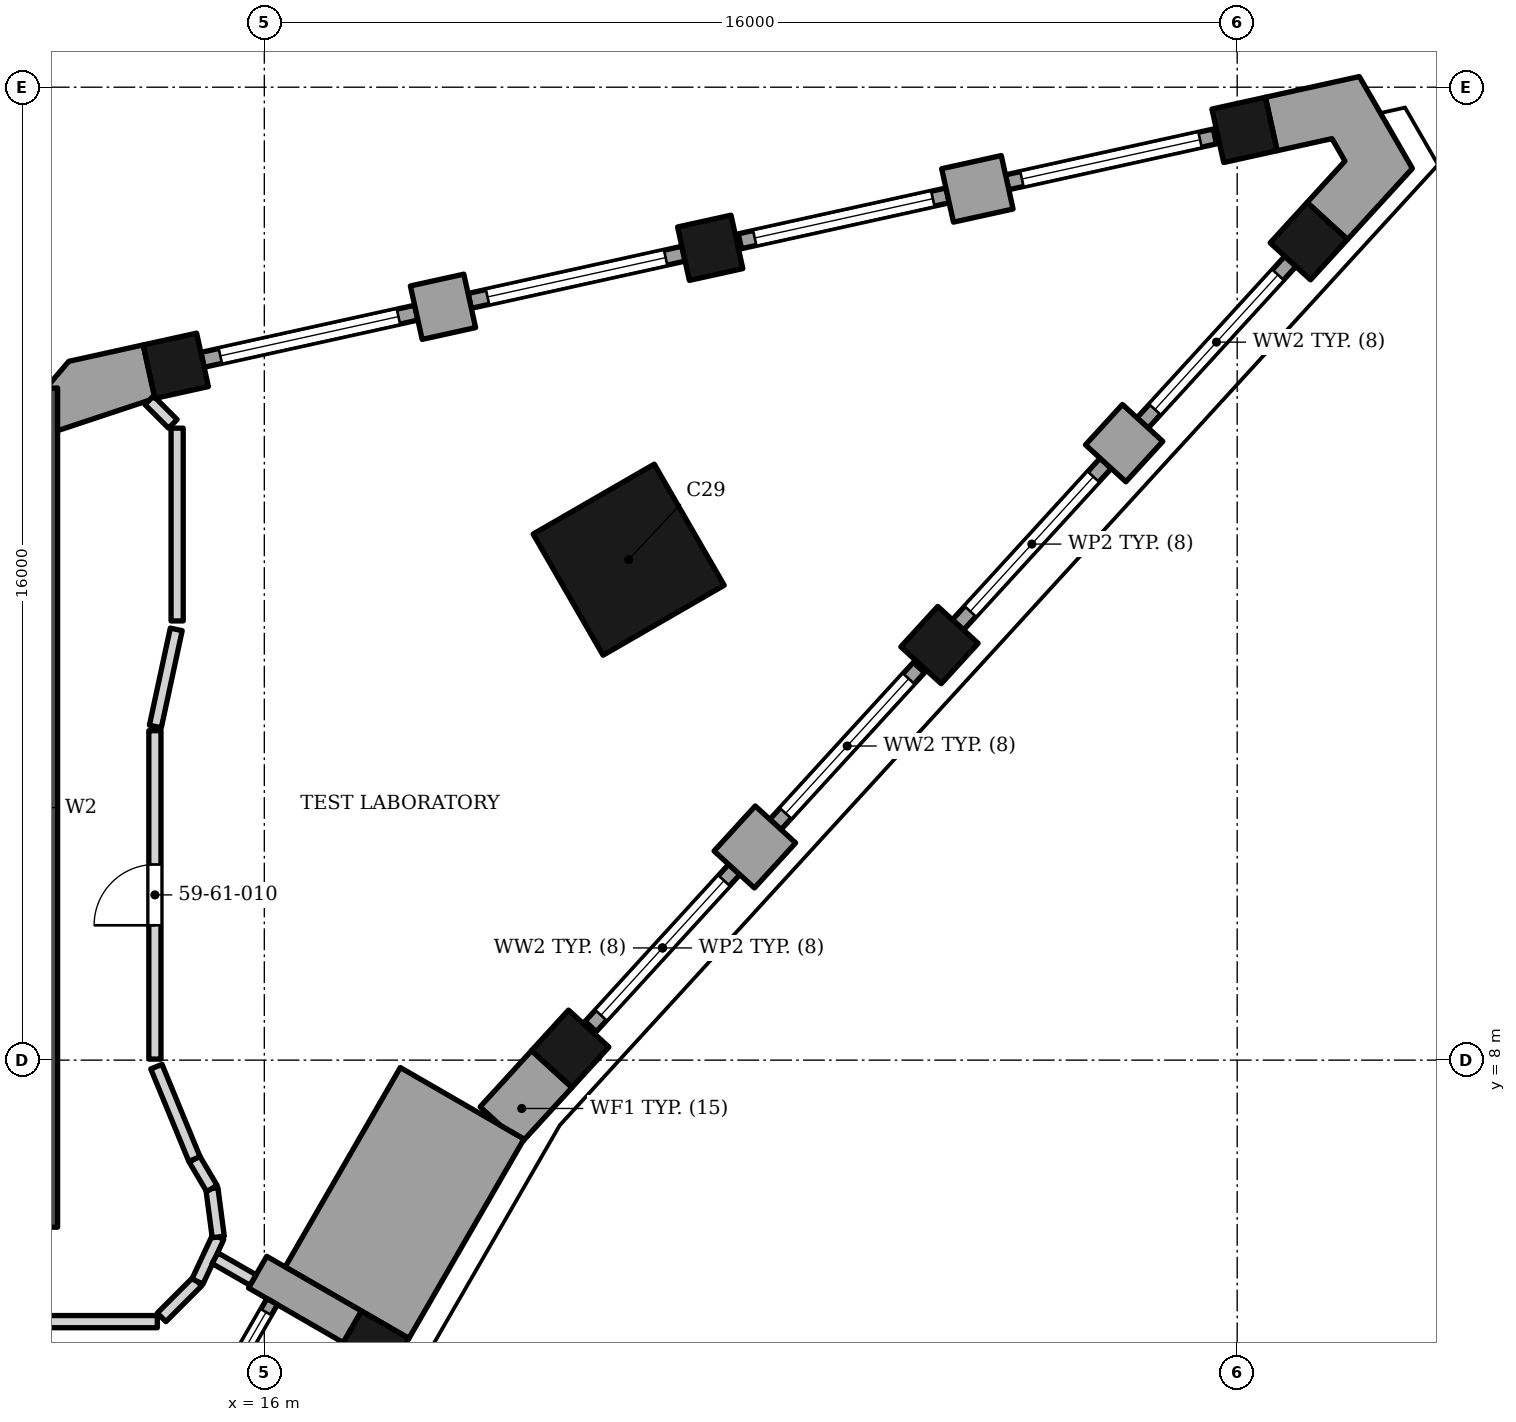
"""IFC4 building model, lengths in metres.
Left out: names, types, materials, properties, quantities, classifications, styles, units other than length and angle.
Written with IfcOpenShell. Run it as: python <this file> out.ifc"""

import sys

from ifc_helpers import new_model, si_unit, direction, frame, frame_2d, origin, origin_2d, place, context, subcontext, project, spatial, polyline, rectangle, outline, extrude, element, fill, save


model = new_model("IFC4")
c1 = context("Model", 3, precision=1e-05, world=origin(), true_north=direction((0.0, 1.0)))
c2 = subcontext(c1, "Body", "Model", "MODEL_VIEW")
j1 = project(units=[si_unit("LENGTHUNIT", "METRE"), si_unit("PLANEANGLEUNIT", "RADIAN")], contexts=[c1])
p1 = place(None, origin())
s1 = spatial("IfcSite", under=j1, at=p1, CompositionType="ELEMENT")
p2 = place(p1, origin())
s2 = spatial("IfcBuilding", under=s1, at=p2, CompositionType="ELEMENT")
p3 = place(p2, frame((0.0, 0.0, 248.2)))
s3 = spatial("IfcBuildingStorey", under=s2, at=p3, CompositionType="ELEMENT", Elevation=248.2)
p4 = place(p3, frame((12.35, 5.253, 0.0), z_axis=(0.0, 0.0, 1.0), x_axis=(0.0, 1.0, 0.0)))
e1 = element("IfcWall", 1, at=p4, inside=s3, PredefinedType="SHEAR", context=c2, shape_type="SweptSolid", body=[
    extrude(rectangle(XDim=13.8, YDim=0.5, at=frame_2d((6.9, 0.0))), origin(), (0.0, 0.0, 1.0), 3.9),
])
p5 = place(p3, frame((21.992, 16.23, 0.0), z_axis=(0.0, 0.0, 1.0), x_axis=(-0.866025377604, -0.500000045345, 0.0)))
e2 = element("IfcColumn", 2, at=p5, inside=s3, PredefinedType="COLUMN", context=c2, shape_type="SweptSolid", body=[
    extrude(rectangle(XDim=2.3, YDim=2.3, at=origin_2d()), origin(), (0.0, 0.0, 1.0), 3.9),
])
for number, where, z_axis, x_axis in (
    (3, (17.763, 3.259, 0.0), (0.0, 0.0, 1.0), (0.5, 0.866, 0.0)),
    (4, (21.031, 8.187, 0.0), (0.0, 0.0, 1.0), (0.675, 0.738, 0.0)),
    (5, (27.104, 14.826, 0.0), (0.0, 0.0, 1.0), (0.675, 0.738, 0.0)),
    (6, (33.178, 21.468, 0.0), (0.0, 0.0, 1.0), (0.675, 0.738, 0.0)),
    (7, (32.121, 23.298, 0.0), (0.0, 0.0, 1.0), (-0.977, -0.215, 0.0)),
    (8, (23.333, 21.359, 0.0), (0.0, 0.0, 1.0), (-0.977, -0.215, 0.0)),
    (9, (14.544, 19.419, 0.0), (0.0, 0.0, 1.0), (-0.977, -0.215, 0.0)),
):
    element("IfcColumn", number, at=place(p3, frame(where, z_axis=z_axis, x_axis=x_axis)), inside=s3, PredefinedType="COLUMN", context=c2, shape_type="SweptSolid", body=[
        extrude(rectangle(XDim=0.9, YDim=0.9, at=origin_2d()), origin(), (0.0, 0.0, 1.0), 3.9),
    ])
p6 = place(p3, frame((17.448, 3.614, 0.0), z_axis=(0.0, 0.0, 1.0), x_axis=(-0.865989075817, 0.500062916607, 0.0)))
e10 = element("IfcWall", 10, at=p6, inside=s3, PredefinedType="SOLIDWALL", context=c2, shape_type="SweptSolid", body=[
    extrude(rectangle(XDim=1.8, YDim=0.6, at=frame_2d((0.9, 0.0))), origin(), (0.0, 0.0, 1.0), 2.95),
])
p7 = place(p3, frame((14.029, 0.392, 0.0), z_axis=(0.0, 0.0, 1.0), x_axis=(0.500027713859, 0.866009402589, 0.0)))
e11 = element("IfcWall", 11, at=p7, inside=s3, PredefinedType="ELEMENTEDWALL", context=c2, shape_type="SweptSolid", body=[
    extrude(rectangle(XDim=4.2, YDim=0.2, at=frame_2d((2.1, 0.0))), origin(), (0.0, 0.0, 1.0), 2.95),
])
p8 = place(p7, frame((0.2, 0.0, 0.45)))
e12 = element("IfcOpeningElement", 12, at=p8, cuts=e11, PredefinedType="OPENING", context=c2, shape_type="SweptSolid", body=[
    extrude(rectangle(XDim=3.8, YDim=2.25, at=frame_2d((1.9, 1.125))), frame((0.0, 0.11, 0.0), z_axis=(0.0, -1.0, 0.0), x_axis=(1.0, 0.0, 0.0)), (0.0, 0.0, 1.0), 0.22),
])
p9 = place(p3, origin())
e13 = element("IfcWall", 13, at=p9, inside=s3, PredefinedType="SOLIDWALL", context=c2, shape_type="SweptSolid", body=[
    extrude(outline(polyline([(18.378, 3.424), (18.378, 3.424), (18.378, 3.424), (20.271, 6.703), (18.236, 7.878), (16.343, 4.599), (17.598, 3.874), (17.598, 3.874), (18.378, 3.424)])), origin(), (0.0, 0.0, 1.0), 2.974),
])
p10 = place(p3, frame((23.729, 11.135, 0.0), z_axis=(0.0, 0.0, 1.0), x_axis=(0.674788120713, 0.738011512203, 0.0)))
e14 = element("IfcWall", 14, at=p10, inside=s3, PredefinedType="SOLIDWALL", context=c2, shape_type="SweptSolid", body=[
    extrude(rectangle(XDim=1.004, YDim=0.9, at=frame_2d((0.502, 0.0))), origin(), (0.0, 0.0, 1.0), 3.0),
])
p11 = place(p3, frame((30.445, 18.479, 0.0), z_axis=(0.0, 0.0, 1.0), x_axis=(-0.674938051731, -0.737874397391, 0.0)))
e15 = element("IfcWall", 15, at=p11, inside=s3, PredefinedType="SOLIDWALL", context=c2, shape_type="SweptSolid", body=[
    extrude(rectangle(XDim=0.9, YDim=0.9, at=frame_2d((0.45, 0.0))), origin(), (0.0, 0.0, 1.0), 3.0),
])
p12 = place(p3, frame((21.368, 8.554, 0.0), z_axis=(0.0, 0.0, 1.0), x_axis=(0.67487449122, 0.737932531537, 0.0)))
e16 = element("IfcWall", 16, at=p12, inside=s3, PredefinedType="ELEMENTEDWALL", context=c2, shape_type="SweptSolid", body=[
    extrude(rectangle(XDim=3.5, YDim=0.25, at=frame_2d((1.75, 0.0))), origin(), (0.0, 0.0, 1.0), 3.0),
])
p13 = place(p12, frame((0.25, 0.0, 0.3)))
e17 = element("IfcOpeningElement", 17, at=p13, cuts=e16, PredefinedType="OPENING", context=c2, shape_type="SweptSolid", body=[
    extrude(rectangle(XDim=3.0, YDim=2.5, at=frame_2d((1.5, 1.25))), frame((0.0, 0.135, 0.0), z_axis=(0.0, -1.0, 0.0), x_axis=(1.0, 0.0, 0.0)), (0.0, 0.0, 1.0), 0.27),
])
p14 = place(p3, frame((24.405, 11.875, 0.0), z_axis=(0.0, 0.0, 1.0), x_axis=(0.67487449122, 0.737932531537, 0.0)))
e18 = element("IfcWall", 18, at=p14, inside=s3, PredefinedType="ELEMENTEDWALL", context=c2, shape_type="SweptSolid", body=[
    extrude(rectangle(XDim=3.5, YDim=0.25, at=frame_2d((1.75, 0.0))), origin(), (0.0, 0.0, 1.0), 3.0),
])
p15 = place(p14, frame((0.25, 0.0, 0.3)))
e19 = element("IfcOpeningElement", 19, at=p15, cuts=e18, PredefinedType="OPENING", context=c2, shape_type="SweptSolid", body=[
    extrude(rectangle(XDim=3.0, YDim=2.5, at=frame_2d((1.5, 1.25))), frame((0.0, 0.135, 0.0), z_axis=(0.0, -1.0, 0.0), x_axis=(1.0, 0.0, 0.0)), (0.0, 0.0, 1.0), 0.27),
])
p16 = place(p3, frame((27.408, 15.158, 0.0), z_axis=(0.0, 0.0, 1.0), x_axis=(0.674833575111, 0.737969949187, 0.0)))
e20 = element("IfcWall", 20, at=p16, inside=s3, PredefinedType="ELEMENTEDWALL", context=c2, shape_type="SweptSolid", body=[
    extrude(rectangle(XDim=3.6, YDim=0.25, at=frame_2d((1.8, 0.0))), origin(), (0.0, 0.0, 1.0), 3.0),
])
p17 = place(p16, frame((0.3, 0.0, 0.3)))
e21 = element("IfcOpeningElement", 21, at=p17, cuts=e20, PredefinedType="OPENING", context=c2, shape_type="SweptSolid", body=[
    extrude(rectangle(XDim=3.0, YDim=2.5, at=frame_2d((1.5, 1.25))), frame((0.0, 0.135, 0.0), z_axis=(0.0, -1.0, 0.0), x_axis=(1.0, 0.0, 0.0)), (0.0, 0.0, 1.0), 0.27),
])
p18 = place(p3, frame((30.445, 18.479, 0.0), z_axis=(0.0, 0.0, 1.0), x_axis=(0.674833575111, 0.737969949187, 0.0)))
e22 = element("IfcWall", 22, at=p18, inside=s3, PredefinedType="ELEMENTEDWALL", context=c2, shape_type="SweptSolid", body=[
    extrude(rectangle(XDim=3.6, YDim=0.25, at=frame_2d((1.8, 0.0))), origin(), (0.0, 0.0, 1.0), 3.0),
])
p19 = place(p18, frame((0.3, 0.0, 0.3)))
e23 = element("IfcOpeningElement", 23, at=p19, cuts=e22, PredefinedType="OPENING", context=c2, shape_type="SweptSolid", body=[
    extrude(rectangle(XDim=3.0, YDim=2.5, at=frame_2d((1.5, 1.25))), frame((0.0, 0.135, 0.0), z_axis=(0.0, -1.0, 0.0), x_axis=(1.0, 0.0, 0.0)), (0.0, 0.0, 1.0), 0.27),
])
p20 = place(p3, frame((28.217, 22.436, 0.0), z_axis=(0.0, 0.0, 1.0), x_axis=(-0.97656888558, -0.215205045752, 0.0)))
e24 = element("IfcWall", 24, at=p20, inside=s3, PredefinedType="SOLIDWALL", context=c2, shape_type="SweptSolid", body=[
    extrude(rectangle(XDim=1.004, YDim=0.9, at=frame_2d((0.502, 0.0))), origin(), (0.0, 0.0, 1.0), 3.0),
])
p21 = place(p3, frame((18.499, 20.292, 0.0), z_axis=(0.0, 0.0, 1.0), x_axis=(0.976473402733, 0.215637876437, 0.0)))
e25 = element("IfcWall", 25, at=p21, inside=s3, PredefinedType="SOLIDWALL", context=c2, shape_type="SweptSolid", body=[
    extrude(rectangle(XDim=0.9, YDim=0.9, at=frame_2d((0.45, 0.0))), origin(), (0.0, 0.0, 1.0), 3.0),
])
p22 = place(p3, frame((31.633, 23.19, 0.0), z_axis=(0.0, 0.0, 1.0), x_axis=(-0.976509313763, -0.215475196101, 0.0)))
e26 = element("IfcWall", 26, at=p22, inside=s3, PredefinedType="ELEMENTEDWALL", context=c2, shape_type="SweptSolid", body=[
    extrude(rectangle(XDim=3.5, YDim=0.25, at=frame_2d((1.75, 0.0))), origin(), (0.0, 0.0, 1.0), 3.0),
])
p23 = place(p22, frame((0.25, 0.0, 0.3)))
e27 = element("IfcOpeningElement", 27, at=p23, cuts=e26, PredefinedType="OPENING", context=c2, shape_type="SweptSolid", body=[
    extrude(rectangle(XDim=3.0, YDim=2.5, at=frame_2d((1.5, 1.25))), frame((0.0, 0.135, 0.0), z_axis=(0.0, -1.0, 0.0), x_axis=(1.0, 0.0, 0.0)), (0.0, 0.0, 1.0), 0.27),
])
p24 = place(p3, frame((27.239, 22.22, 0.0), z_axis=(0.0, 0.0, 1.0), x_axis=(-0.976509313763, -0.215475196101, 0.0)))
e28 = element("IfcWall", 28, at=p24, inside=s3, PredefinedType="ELEMENTEDWALL", context=c2, shape_type="SweptSolid", body=[
    extrude(rectangle(XDim=3.5, YDim=0.25, at=frame_2d((1.75, 0.0))), origin(), (0.0, 0.0, 1.0), 3.0),
])
p25 = place(p24, frame((0.25, 0.0, 0.3)))
e29 = element("IfcOpeningElement", 29, at=p25, cuts=e28, PredefinedType="OPENING", context=c2, shape_type="SweptSolid", body=[
    extrude(rectangle(XDim=3.0, YDim=2.5, at=frame_2d((1.5, 1.25))), frame((0.0, 0.135, 0.0), z_axis=(0.0, -1.0, 0.0), x_axis=(1.0, 0.0, 0.0)), (0.0, 0.0, 1.0), 0.27),
])
p26 = place(p3, frame((22.893, 21.262, 0.0), z_axis=(0.0, 0.0, 1.0), x_axis=(-0.976513072969, -0.215458159096, 0.0)))
e30 = element("IfcWall", 30, at=p26, inside=s3, PredefinedType="ELEMENTEDWALL", context=c2, shape_type="SweptSolid", body=[
    extrude(rectangle(XDim=3.6, YDim=0.25, at=frame_2d((1.8, 0.0))), origin(), (0.0, 0.0, 1.0), 3.0),
])
p27 = place(p26, frame((0.3, 0.0, 0.3)))
e31 = element("IfcOpeningElement", 31, at=p27, cuts=e30, PredefinedType="OPENING", context=c2, shape_type="SweptSolid", body=[
    extrude(rectangle(XDim=3.0, YDim=2.5, at=frame_2d((1.5, 1.25))), frame((0.0, 0.135, 0.0), z_axis=(0.0, -1.0, 0.0), x_axis=(1.0, 0.0, 0.0)), (0.0, 0.0, 1.0), 0.27),
])
p28 = place(p3, frame((18.499, 20.292, 0.0), z_axis=(0.0, 0.0, 1.0), x_axis=(-0.976513072969, -0.215458159096, 0.0)))
e32 = element("IfcWall", 32, at=p28, inside=s3, PredefinedType="ELEMENTEDWALL", context=c2, shape_type="SweptSolid", body=[
    extrude(rectangle(XDim=3.6, YDim=0.25, at=frame_2d((1.8, 0.0))), origin(), (0.0, 0.0, 1.0), 3.0),
])
p29 = place(p28, frame((0.3, 0.0, 0.3)))
e33 = element("IfcOpeningElement", 33, at=p29, cuts=e32, PredefinedType="OPENING", context=c2, shape_type="SweptSolid", body=[
    extrude(rectangle(XDim=3.0, YDim=2.5, at=frame_2d((1.5, 1.25))), frame((0.0, 0.135, 0.0), z_axis=(0.0, -1.0, 0.0), x_axis=(1.0, 0.0, 0.0)), (0.0, 0.0, 1.0), 0.27),
])
p30 = place(p3, origin())
e34 = element("IfcWall", 34, at=p30, inside=s3, PredefinedType="SOLIDWALL", context=c2, shape_type="SweptSolid", body=[
    extrude(outline(polyline([(20.395, 8.156), (19.549, 7.232), (19.881, 6.928), (20.271, 6.703), (20.247, 6.661), (21.059, 7.549), (20.395, 8.156)])), origin(), (0.0, 0.0, 1.0), 3.0),
])
p31 = place(p3, origin())
e35 = element("IfcWall", 35, at=p31, inside=s3, PredefinedType="SOLIDWALL", context=c2, shape_type="SweptSolid", body=[
    extrude(outline(polyline([(33.814, 21.496), (34.882, 22.664), (34.009, 24.175), (32.464, 23.834), (32.658, 22.955), (33.559, 23.154), (33.772, 22.785), (33.15, 22.104), (33.814, 21.496)])), origin(), (0.0, 0.0, 1.0), 3.0),
])
p32 = place(p3, origin())
e36 = element("IfcWall", 36, at=p32, inside=s3, PredefinedType="SOLIDWALL", context=c2, shape_type="SweptSolid", body=[
    extrude(outline(polyline([(14.201, 18.883), (14.008, 19.762), (12.784, 19.492), (12.41, 19.052), (12.6, 19.052), (12.6, 18.352), (14.201, 18.883)])), origin(), (0.0, 0.0, 1.0), 3.0),
])
p33 = place(p3, frame((8.726, 3.699, 0.0), z_axis=(0.0, 0.0, 1.0), x_axis=(1.0, 0.0, 0.0)))
e37 = element("IfcWall", 37, at=p33, inside=s3, PredefinedType="PARTITIONING", context=c2, shape_type="SweptSolid", body=[
    extrude(rectangle(XDim=5.514, YDim=0.2, at=frame_2d((2.757, 0.0))), origin(), (0.0, 0.0, 1.0), 3.282),
])
p34 = place(p33, frame((2.307, 0.0, 0.0)))
e38 = element("IfcOpeningElement", 38, at=p34, cuts=e37, PredefinedType="OPENING", context=c2, shape_type="SweptSolid", body=[
    extrude(rectangle(XDim=0.9, YDim=2.1, at=frame_2d((0.45, 1.05))), frame((0.0, 0.11, 0.0), z_axis=(0.0, -1.0, 0.0), x_axis=(1.0, 0.0, 0.0)), (0.0, 0.0, 1.0), 0.22),
])
p35 = place(p3, frame((14.311, 3.77, 0.0), z_axis=(0.0, 0.0, 1.0), x_axis=(0.707253195258, 0.706960336792, 0.0)))
e39 = element("IfcWall", 39, at=p35, inside=s3, PredefinedType="PARTITIONING", context=c2, shape_type="SweptSolid", body=[
    extrude(rectangle(XDim=0.834, YDim=0.2, at=frame_2d((0.417, 0.0))), origin(), (0.0, 0.0, 1.0), 3.73),
])
p36 = place(p3, frame((14.9, 4.36, 0.0), z_axis=(0.0, 0.0, 1.0), x_axis=(0.423133460634, 0.906067367524, 0.0)))
e40 = element("IfcWall", 40, at=p36, inside=s3, PredefinedType="PARTITIONING", context=c2, shape_type="SweptSolid", body=[
    extrude(rectangle(XDim=0.808, YDim=0.2, at=frame_2d((0.404, 0.0))), origin(), (0.0, 0.0, 1.0), 2.95),
])
p37 = place(p3, frame((15.19, 4.743, 0.0), z_axis=(0.0, 0.0, 1.0), x_axis=(0.867114884312, -0.498108198491, 0.0)))
e41 = element("IfcWall", 41, at=p37, inside=s3, PredefinedType="PARTITIONING", context=c2, shape_type="SweptSolid", body=[
    extrude(rectangle(XDim=0.72, YDim=0.2, at=frame_2d((0.36, 0.0))), origin(), (0.0, 0.0, 1.0), 2.95),
])
p38 = place(p3, frame((15.137, 5.889, 0.0), z_axis=(0.0, 0.0, 1.0), x_axis=(0.130572336197, -0.991438785312, 0.0)))
e42 = element("IfcWall", 42, at=p38, inside=s3, PredefinedType="PARTITIONING", context=c2, shape_type="SweptSolid", body=[
    extrude(rectangle(XDim=0.804, YDim=0.2, at=frame_2d((0.402, 0.0))), origin(), (0.0, 0.0, 1.0), 3.73),
])
p39 = place(p3, frame((14.851, 6.374, 0.0), z_axis=(0.0, 0.0, 1.0), x_axis=(0.509576505793, -0.860425351058, 0.0)))
e43 = element("IfcWall", 43, at=p39, inside=s3, PredefinedType="PARTITIONING", context=c2, shape_type="SweptSolid", body=[
    extrude(rectangle(XDim=0.563, YDim=0.2, at=frame_2d((0.281, 0.0))), origin(), (0.0, 0.0, 1.0), 3.73),
])
p40 = place(p3, frame((14.225, 7.893, 0.0), z_axis=(0.0, 0.0, 1.0), x_axis=(0.380697489052, -0.924699638709, 0.0)))
e44 = element("IfcWall", 44, at=p40, inside=s3, PredefinedType="PARTITIONING", context=c2, shape_type="SweptSolid", body=[
    extrude(rectangle(XDim=1.643, YDim=0.2, at=frame_2d((0.822, 0.0))), origin(), (0.0, 0.0, 1.0), 3.73),
])
p41 = place(p3, frame((14.2, 8.017, 0.0), z_axis=(0.0, 0.0, 1.0), x_axis=(0.0, 1.0, 0.0)))
e45 = element("IfcWall", 45, at=p41, inside=s3, PredefinedType="PARTITIONING", context=c2, shape_type="SweptSolid", body=[
    extrude(rectangle(XDim=5.4, YDim=0.2, at=frame_2d((2.7, 0.0))), origin(), (0.0, 0.0, 1.0), 3.73),
])
p42 = place(p41, frame((2.2, 0.0, 0.0)))
e46 = element("IfcOpeningElement", 46, at=p42, cuts=e45, PredefinedType="OPENING", context=c2, shape_type="SweptSolid", body=[
    extrude(rectangle(XDim=1.0, YDim=2.4, at=frame_2d((0.5, 1.2))), frame((0.0, 0.11, 0.0), z_axis=(0.0, -1.0, 0.0), x_axis=(1.0, 0.0, 0.0)), (0.0, 0.0, 1.0), 0.22),
])
p43 = place(p3, frame((14.208, 13.487, 0.0), z_axis=(0.0, 0.0, 1.0), x_axis=(0.210294567168, 0.977638069543, 0.0)))
e47 = element("IfcWall", 47, at=p43, inside=s3, PredefinedType="PARTITIONING", context=c2, shape_type="SweptSolid", body=[
    extrude(rectangle(XDim=1.634, YDim=0.2, at=frame_2d((0.817, 0.0))), origin(), (0.0, 0.0, 1.0), 3.73),
])
p44 = place(p3, frame((14.566, 18.393, 0.0), z_axis=(0.0, 0.0, 1.0), x_axis=(0.0, -1.0, 0.0)))
e48 = element("IfcWall", 48, at=p44, inside=s3, PredefinedType="PARTITIONING", context=c2, shape_type="SweptSolid", body=[
    extrude(rectangle(XDim=3.17, YDim=0.2, at=frame_2d((1.585, 0.0))), origin(), (0.0, 0.0, 1.0), 3.73),
])
p45 = place(p3, frame((14.107, 18.852, 0.0), z_axis=(0.0, 0.0, 1.0), x_axis=(0.707106781187, -0.707106781187, 0.0)))
e49 = element("IfcWall", 49, at=p45, inside=s3, PredefinedType="PARTITIONING", context=c2, shape_type="SweptSolid", body=[
    extrude(rectangle(XDim=0.549, YDim=0.2, at=frame_2d((0.275, 0.0))), origin(), (0.0, 0.0, 1.0), 3.73),
])
p46 = place(p8, origin())
e50 = element("IfcWindow", 50, at=p46, inside=s3, PartitioningType="SINGLE_PANEL", PredefinedType="WINDOW", context=c2, shape_type="SweptSolid", body=[
    extrude(rectangle(XDim=3.8, YDim=2.25, at=frame_2d((1.9, 1.125))), frame((0.0, 0.03, 0.0), z_axis=(0.0, -1.0, 0.0), x_axis=(1.0, 0.0, 0.0)), (0.0, 0.0, 1.0), 0.06),
])
fill(e12, e50)
p47 = place(p13, origin())
e51 = element("IfcWindow", 51, at=p47, inside=s3, PartitioningType="SINGLE_PANEL", PredefinedType="WINDOW", context=c2, shape_type="SweptSolid", body=[
    extrude(rectangle(XDim=3.0, YDim=2.5, at=frame_2d((1.5, 1.25))), frame((0.0, 0.03, 0.0), z_axis=(0.0, -1.0, 0.0), x_axis=(1.0, 0.0, 0.0)), (0.0, 0.0, 1.0), 0.06),
])
fill(e17, e51)
p48 = place(p15, origin())
e52 = element("IfcWindow", 52, at=p48, inside=s3, PartitioningType="SINGLE_PANEL", PredefinedType="WINDOW", context=c2, shape_type="SweptSolid", body=[
    extrude(rectangle(XDim=3.0, YDim=2.5, at=frame_2d((1.5, 1.25))), frame((0.0, 0.03, 0.0), z_axis=(0.0, -1.0, 0.0), x_axis=(1.0, 0.0, 0.0)), (0.0, 0.0, 1.0), 0.06),
])
fill(e19, e52)
p49 = place(p17, origin())
e53 = element("IfcWindow", 53, at=p49, inside=s3, PartitioningType="SINGLE_PANEL", PredefinedType="WINDOW", context=c2, shape_type="SweptSolid", body=[
    extrude(rectangle(XDim=3.0, YDim=2.5, at=frame_2d((1.5, 1.25))), frame((0.0, 0.03, 0.0), z_axis=(0.0, -1.0, 0.0), x_axis=(1.0, 0.0, 0.0)), (0.0, 0.0, 1.0), 0.06),
])
fill(e21, e53)
p50 = place(p19, origin())
e54 = element("IfcWindow", 54, at=p50, inside=s3, PartitioningType="SINGLE_PANEL", PredefinedType="WINDOW", context=c2, shape_type="SweptSolid", body=[
    extrude(rectangle(XDim=3.0, YDim=2.5, at=frame_2d((1.5, 1.25))), frame((0.0, 0.03, 0.0), z_axis=(0.0, -1.0, 0.0), x_axis=(1.0, 0.0, 0.0)), (0.0, 0.0, 1.0), 0.06),
])
fill(e23, e54)
p51 = place(p23, origin())
e55 = element("IfcWindow", 55, at=p51, inside=s3, PartitioningType="SINGLE_PANEL", PredefinedType="WINDOW", context=c2, shape_type="SweptSolid", body=[
    extrude(rectangle(XDim=3.0, YDim=2.5, at=frame_2d((1.5, 1.25))), frame((0.0, 0.03, 0.0), z_axis=(0.0, -1.0, 0.0), x_axis=(1.0, 0.0, 0.0)), (0.0, 0.0, 1.0), 0.06),
])
fill(e27, e55)
p52 = place(p25, origin())
e56 = element("IfcWindow", 56, at=p52, inside=s3, PartitioningType="SINGLE_PANEL", PredefinedType="WINDOW", context=c2, shape_type="SweptSolid", body=[
    extrude(rectangle(XDim=3.0, YDim=2.5, at=frame_2d((1.5, 1.25))), frame((0.0, 0.03, 0.0), z_axis=(0.0, -1.0, 0.0), x_axis=(1.0, 0.0, 0.0)), (0.0, 0.0, 1.0), 0.06),
])
fill(e29, e56)
p53 = place(p27, origin())
e57 = element("IfcWindow", 57, at=p53, inside=s3, PartitioningType="SINGLE_PANEL", PredefinedType="WINDOW", context=c2, shape_type="SweptSolid", body=[
    extrude(rectangle(XDim=3.0, YDim=2.5, at=frame_2d((1.5, 1.25))), frame((0.0, 0.03, 0.0), z_axis=(0.0, -1.0, 0.0), x_axis=(1.0, 0.0, 0.0)), (0.0, 0.0, 1.0), 0.06),
])
fill(e31, e57)
p54 = place(p29, origin())
e58 = element("IfcWindow", 58, at=p54, inside=s3, PartitioningType="SINGLE_PANEL", PredefinedType="WINDOW", context=c2, shape_type="SweptSolid", body=[
    extrude(rectangle(XDim=3.0, YDim=2.5, at=frame_2d((1.5, 1.25))), frame((0.0, 0.03, 0.0), z_axis=(0.0, -1.0, 0.0), x_axis=(1.0, 0.0, 0.0)), (0.0, 0.0, 1.0), 0.06),
])
fill(e33, e58)
p55 = place(p42, origin())
e59 = element("IfcDoor", 59, at=p55, inside=s3, OperationType="SINGLE_SWING_LEFT", PredefinedType="DOOR", context=c2, shape_type="SweptSolid", body=[
    extrude(rectangle(XDim=1.0, YDim=2.4, at=frame_2d((0.5, 1.2))), frame((0.0, 0.025, 0.0), z_axis=(0.0, -1.0, 0.0), x_axis=(1.0, 0.0, 0.0)), (0.0, 0.0, 1.0), 0.05),
])
fill(e46, e59)
save(model, sys.argv[1])
